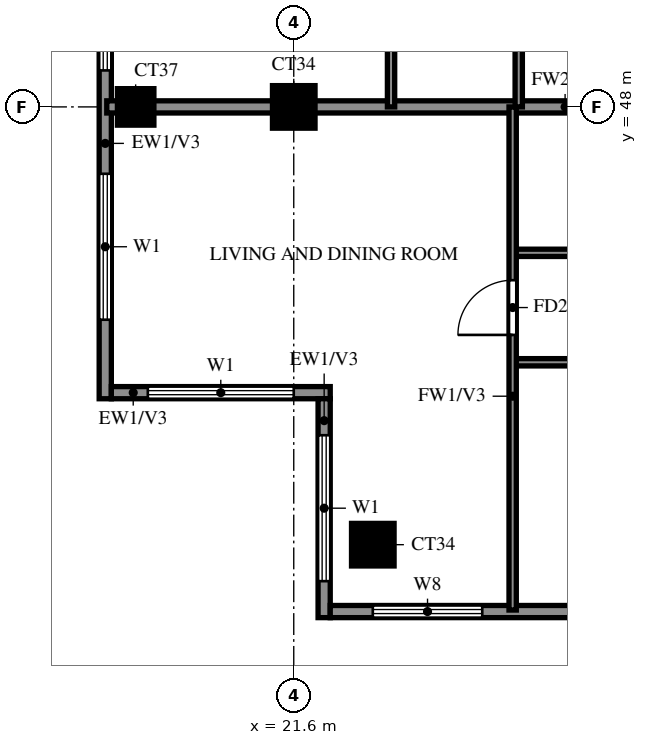
"""IFC4 building model, lengths in metres.
Left out: names, types, materials, properties, quantities, classifications, styles, units other than length and angle.
Written with IfcOpenShell. Run it as: python <this file> out.ifc"""

import sys

from ifc_helpers import new_model, si_unit, direction, frame, frame_2d, origin, origin_2d, place, context, subcontext, project, spatial, rectangle, extrude, source, transform, mapped, element, fill, save


model = new_model("IFC4")
c1 = context("Model", 3, precision=1e-05, world=origin(), true_north=direction((0.0, 1.0)))
c2 = subcontext(c1, "Body", "Model", "MODEL_VIEW")
j1 = project(units=[si_unit("LENGTHUNIT", "METRE"), si_unit("PLANEANGLEUNIT", "RADIAN")], contexts=[c1])
p1 = place(None, origin())
s1 = spatial("IfcSite", under=j1, at=p1, CompositionType="ELEMENT")
p2 = place(p1, origin())
s2 = spatial("IfcBuilding", under=s1, at=p2, CompositionType="ELEMENT")
p3 = place(p2, frame((0.0, 0.0, 257.0)))
s3 = spatial("IfcBuildingStorey", under=s2, at=p3, CompositionType="ELEMENT", Elevation=257.0)
m1 = source(origin(), c2, "Body", "SweptSolid", [
    extrude(rectangle(XDim=0.7, YDim=0.7, at=origin_2d()), origin(), (0.0, 0.0, 1.0), 3.22),
])
p4 = place(p3, frame((22.9, 40.8, 0.0), z_axis=(0.0, 0.0, 1.0), x_axis=(1.0, 0.0, 0.0)))
e1 = element("IfcColumn", 1, at=p4, inside=s3, PredefinedType="COLUMN", context=c2, shape_type="MappedRepresentation", body=[
    mapped(m1, transform((0.0, 0.0, 0.0))),
])
m2 = source(origin(), c2, "Body", "SweptSolid", [
    extrude(rectangle(XDim=0.6, YDim=0.6, at=origin_2d()), origin(), (0.0, 0.0, 1.0), 3.22),
])
p5 = place(p3, frame((19.0, 48.0, 0.0), z_axis=(0.0, 0.0, 1.0), x_axis=(1.0, 0.0, 0.0)))
e2 = element("IfcColumn", 2, at=p5, inside=s3, PredefinedType="COLUMN", context=c2, shape_type="MappedRepresentation", body=[
    mapped(m2, transform((0.0, 0.0, 0.0))),
])
p6 = place(p3, frame((21.6, 48.0, 0.0), z_axis=(0.0, 0.0, 1.0), x_axis=(1.0, 0.0, 0.0)))
e3 = element("IfcColumn", 3, at=p6, inside=s3, PredefinedType="COLUMN", context=c2, shape_type="MappedRepresentation", body=[
    mapped(m1, transform((0.0, 0.0, 0.0))),
])
p7 = place(p3, frame((18.5, 55.2, 0.0), z_axis=(0.0, 0.0, 1.0), x_axis=(0.0, -1.0, 0.0)))
e4 = element("IfcWall", 4, at=p7, inside=s3, PredefinedType="SOLIDWALL", context=c2, shape_type="SweptSolid", body=[
    extrude(rectangle(XDim=12.0, YDim=0.2, at=frame_2d((6.0, 0.0))), origin(), (0.0, 0.0, 1.0), 3.22),
])
p8 = place(p7, frame((8.3, 0.0, 0.6)))
e5 = element("IfcOpeningElement", 5, at=p8, cuts=e4, PredefinedType="OPENING", context=c2, shape_type="SweptSolid", body=[
    extrude(rectangle(XDim=2.4, YDim=2.4, at=frame_2d((1.2, 1.2))), frame((0.0, 0.11, 0.0), z_axis=(0.0, -1.0, 0.0), x_axis=(1.0, 0.0, 0.0)), (0.0, 0.0, 1.0), 0.22),
])
p9 = place(p7, frame((4.2, 0.0, 0.6)))
e6 = element("IfcOpeningElement", 6, at=p9, cuts=e4, PredefinedType="OPENING", context=c2, shape_type="SweptSolid", body=[
    extrude(rectangle(XDim=2.4, YDim=2.4, at=frame_2d((1.2, 1.2))), frame((0.0, 0.11, 0.0), z_axis=(0.0, -1.0, 0.0), x_axis=(1.0, 0.0, 0.0)), (0.0, 0.0, 1.0), 0.22),
])
p10 = place(p7, frame((0.7, 0.0, 0.6)))
e7 = element("IfcOpeningElement", 7, at=p10, cuts=e4, PredefinedType="OPENING", context=c2, shape_type="SweptSolid", body=[
    extrude(rectangle(XDim=2.4, YDim=2.4, at=frame_2d((1.2, 1.2))), frame((0.0, 0.11, 0.0), z_axis=(0.0, -1.0, 0.0), x_axis=(1.0, 0.0, 0.0)), (0.0, 0.0, 1.0), 0.22),
])
p11 = place(p3, frame((18.6, 43.3, 0.0), z_axis=(0.0, 0.0, 1.0), x_axis=(1.0, 0.0, 0.0)))
e8 = element("IfcWall", 8, at=p11, inside=s3, PredefinedType="SOLIDWALL", context=c2, shape_type="SweptSolid", body=[
    extrude(rectangle(XDim=3.6, YDim=0.2, at=frame_2d((1.8, 0.0))), origin(), (0.0, 0.0, 1.0), 3.22),
])
p12 = place(p11, frame((0.6, 0.0, 0.6)))
e9 = element("IfcOpeningElement", 9, at=p12, cuts=e8, PredefinedType="OPENING", context=c2, shape_type="SweptSolid", body=[
    extrude(rectangle(XDim=2.4, YDim=2.4, at=frame_2d((1.2, 1.2))), frame((0.0, 0.11, 0.0), z_axis=(0.0, -1.0, 0.0), x_axis=(1.0, 0.0, 0.0)), (0.0, 0.0, 1.0), 0.22),
])
p13 = place(p3, frame((22.1, 43.2, 0.0), z_axis=(0.0, 0.0, 1.0), x_axis=(0.0, -1.0, 0.0)))
e10 = element("IfcWall", 10, at=p13, inside=s3, PredefinedType="SOLIDWALL", context=c2, shape_type="SweptSolid", body=[
    extrude(rectangle(XDim=3.6, YDim=0.2, at=frame_2d((1.8, 0.0))), origin(), (0.0, 0.0, 1.0), 3.22),
])
p14 = place(p13, frame((0.6, 0.0, 0.6)))
e11 = element("IfcOpeningElement", 11, at=p14, cuts=e10, PredefinedType="OPENING", context=c2, shape_type="SweptSolid", body=[
    extrude(rectangle(XDim=2.4, YDim=2.4, at=frame_2d((1.2, 1.2))), frame((0.0, 0.11, 0.0), z_axis=(0.0, -1.0, 0.0), x_axis=(1.0, 0.0, 0.0)), (0.0, 0.0, 1.0), 0.22),
])
p15 = place(p3, frame((22.2, 39.7, 0.0), z_axis=(0.0, 0.0, 1.0), x_axis=(1.0, 0.0, 0.0)))
e12 = element("IfcWall", 12, at=p15, inside=s3, PredefinedType="SOLIDWALL", context=c2, shape_type="SweptSolid", body=[
    extrude(rectangle(XDim=19.8, YDim=0.2, at=frame_2d((9.9, 0.0))), origin(), (0.0, 0.0, 1.0), 3.22),
])
p16 = place(p15, frame((0.7, 0.0, 0.6)))
e13 = element("IfcOpeningElement", 13, at=p16, cuts=e12, PredefinedType="OPENING", context=c2, shape_type="SweptSolid", body=[
    extrude(rectangle(XDim=1.8, YDim=2.4, at=frame_2d((0.9, 1.2))), frame((0.0, 0.11, 0.0), z_axis=(0.0, -1.0, 0.0), x_axis=(1.0, 0.0, 0.0)), (0.0, 0.0, 1.0), 0.22),
])
p17 = place(p15, frame((4.35, 0.0, 1.5)))
e14 = element("IfcOpeningElement", 14, at=p17, cuts=e12, PredefinedType="OPENING", context=c2, shape_type="SweptSolid", body=[
    extrude(rectangle(XDim=0.9, YDim=0.9, at=frame_2d((0.45, 0.45))), frame((0.0, 0.11, 0.0), z_axis=(0.0, -1.0, 0.0), x_axis=(1.0, 0.0, 0.0)), (0.0, 0.0, 1.0), 0.22),
])
p18 = place(p15, frame((7.8, 0.0, 0.6)))
e15 = element("IfcOpeningElement", 15, at=p18, cuts=e12, PredefinedType="OPENING", context=c2, shape_type="SweptSolid", body=[
    extrude(rectangle(XDim=2.4, YDim=2.4, at=frame_2d((1.2, 1.2))), frame((0.0, 0.11, 0.0), z_axis=(0.0, -1.0, 0.0), x_axis=(1.0, 0.0, 0.0)), (0.0, 0.0, 1.0), 0.22),
])
p19 = place(p3, frame((18.525, 48.0, 0.0), z_axis=(0.0, 0.0, 1.0), x_axis=(1.0, 0.0, 0.0)))
e16 = element("IfcWall", 16, at=p19, inside=s3, PredefinedType="SOLIDWALL", context=c2, shape_type="SweptSolid", body=[
    extrude(rectangle(XDim=15.075, YDim=0.2, at=frame_2d((7.538, 0.0))), origin(), (0.0, 0.0, 1.0), 3.22),
])
p20 = place(p3, frame((25.2, 43.8, 0.0), z_axis=(0.0, 0.0, 1.0), x_axis=(1.0, 0.0, 0.0)))
e17 = element("IfcWall", 17, at=p20, inside=s3, PredefinedType="PARTITIONING", context=c2, shape_type="SweptSolid", body=[
    extrude(rectangle(XDim=8.4, YDim=0.12, at=frame_2d((4.2, 0.0))), origin(), (0.0, 0.0, 1.0), 3.22),
])
p21 = place(p20, frame((1.35, 0.0, 0.0)))
e18 = element("IfcOpeningElement", 18, at=p21, cuts=e17, PredefinedType="OPENING", context=c2, shape_type="SweptSolid", body=[
    extrude(rectangle(XDim=0.9, YDim=2.1, at=frame_2d((0.45, 1.05))), frame((0.0, 0.07, 0.0), z_axis=(0.0, -1.0, 0.0), x_axis=(1.0, 0.0, 0.0)), (0.0, 0.0, 1.0), 0.14),
])
p22 = place(p20, frame((5.55, 0.0, 0.0)))
e19 = element("IfcOpeningElement", 19, at=p22, cuts=e17, PredefinedType="OPENING", context=c2, shape_type="SweptSolid", body=[
    extrude(rectangle(XDim=0.9, YDim=2.1, at=frame_2d((0.45, 1.05))), frame((0.0, 0.07, 0.0), z_axis=(0.0, -1.0, 0.0), x_axis=(1.0, 0.0, 0.0)), (0.0, 0.0, 1.0), 0.14),
])
p23 = place(p3, frame((25.2, 45.6, 0.0), z_axis=(0.0, 0.0, 1.0), x_axis=(1.0, 0.0, 0.0)))
e20 = element("IfcWall", 20, at=p23, inside=s3, PredefinedType="PARTITIONING", context=c2, shape_type="SweptSolid", body=[
    extrude(rectangle(XDim=6.0, YDim=0.12, at=frame_2d((3.0, 0.0))), origin(), (0.0, 0.0, 1.0), 3.22),
])
p24 = place(p23, frame((2.55, 0.0, 0.0)))
e21 = element("IfcOpeningElement", 21, at=p24, cuts=e20, PredefinedType="OPENING", context=c2, shape_type="SweptSolid", body=[
    extrude(rectangle(XDim=0.9, YDim=2.1, at=frame_2d((0.45, 1.05))), frame((0.0, 0.07, 0.0), z_axis=(0.0, -1.0, 0.0), x_axis=(1.0, 0.0, 0.0)), (0.0, 0.0, 1.0), 0.14),
])
p25 = place(p3, frame((23.2, 48.0, 0.0), z_axis=(0.0, 0.0, 1.0), x_axis=(0.0, 1.0, 0.0)))
e22 = element("IfcWall", 22, at=p25, inside=s3, PredefinedType="PARTITIONING", context=c2, shape_type="SweptSolid", body=[
    extrude(rectangle(XDim=21.6, YDim=0.12, at=frame_2d((10.8, 0.0))), origin(), (0.0, 0.0, 1.0), 3.22),
])
p26 = place(p25, frame((1.35, 0.0, 0.0)))
e23 = element("IfcOpeningElement", 23, at=p26, cuts=e22, PredefinedType="OPENING", context=c2, shape_type="SweptSolid", body=[
    extrude(rectangle(XDim=0.9, YDim=2.1, at=frame_2d((0.45, 1.05))), frame((0.0, 0.07, 0.0), z_axis=(0.0, -1.0, 0.0), x_axis=(1.0, 0.0, 0.0)), (0.0, 0.0, 1.0), 0.14),
])
p27 = place(p25, frame((7.95, 0.0, 0.0)))
e24 = element("IfcOpeningElement", 24, at=p27, cuts=e22, PredefinedType="OPENING", context=c2, shape_type="SweptSolid", body=[
    extrude(rectangle(XDim=1.5, YDim=2.1, at=frame_2d((0.75, 1.05))), frame((0.0, 0.07, 0.0), z_axis=(0.0, -1.0, 0.0), x_axis=(1.0, 0.0, 0.0)), (0.0, 0.0, 1.0), 0.14),
])
p28 = place(p25, frame((12.15, 0.0, 0.0)))
e25 = element("IfcOpeningElement", 25, at=p28, cuts=e22, PredefinedType="OPENING", context=c2, shape_type="SweptSolid", body=[
    extrude(rectangle(XDim=0.9, YDim=2.1, at=frame_2d((0.45, 1.05))), frame((0.0, 0.07, 0.0), z_axis=(0.0, -1.0, 0.0), x_axis=(1.0, 0.0, 0.0)), (0.0, 0.0, 1.0), 0.14),
])
p29 = place(p25, frame((17.55, 0.0, 0.0)))
e26 = element("IfcOpeningElement", 26, at=p29, cuts=e22, PredefinedType="OPENING", context=c2, shape_type="SweptSolid", body=[
    extrude(rectangle(XDim=0.9, YDim=2.1, at=frame_2d((0.45, 1.05))), frame((0.0, 0.07, 0.0), z_axis=(0.0, -1.0, 0.0), x_axis=(1.0, 0.0, 0.0)), (0.0, 0.0, 1.0), 0.14),
])
p30 = place(p3, frame((25.2, 39.725, 0.0), z_axis=(0.0, 0.0, 1.0), x_axis=(0.0, 1.0, 0.0)))
e27 = element("IfcWall", 27, at=p30, inside=s3, PredefinedType="PARTITIONING", context=c2, shape_type="SweptSolid", body=[
    extrude(rectangle(XDim=8.275, YDim=0.12, at=frame_2d((4.137, 0.0))), origin(), (0.0, 0.0, 1.0), 3.22),
])
p31 = place(p30, frame((4.525, 0.0, 0.0)))
e28 = element("IfcOpeningElement", 28, at=p31, cuts=e27, PredefinedType="OPENING", context=c2, shape_type="SweptSolid", body=[
    extrude(rectangle(XDim=0.9, YDim=2.1, at=frame_2d((0.45, 1.05))), frame((0.0, 0.07, 0.0), z_axis=(0.0, -1.0, 0.0), x_axis=(1.0, 0.0, 0.0)), (0.0, 0.0, 1.0), 0.14),
])
p32 = place(p3, frame((25.3, 48.0, 0.0), z_axis=(0.0, 0.0, 1.0), x_axis=(0.0, 1.0, 0.0)))
e29 = element("IfcWall", 29, at=p32, inside=s3, PredefinedType="PARTITIONING", context=c2, shape_type="SweptSolid", body=[
    extrude(rectangle(XDim=3.6, YDim=0.12, at=frame_2d((1.8, 0.0))), origin(), (0.0, 0.0, 1.0), 3.22),
])
p33 = place(p32, frame((1.4, 0.0, 0.0)))
e30 = element("IfcOpeningElement", 30, at=p33, cuts=e29, PredefinedType="OPENING", context=c2, shape_type="SweptSolid", body=[
    extrude(rectangle(XDim=0.8, YDim=2.1, at=frame_2d((0.4, 1.05))), frame((0.0, 0.07, 0.0), z_axis=(0.0, -1.0, 0.0), x_axis=(1.0, 0.0, 0.0)), (0.0, 0.0, 1.0), 0.14),
])
p34 = place(p8, origin())
e31 = element("IfcWindow", 31, at=p34, inside=s3, PartitioningType="DOUBLE_PANEL_VERTICAL", PredefinedType="WINDOW", context=c2, shape_type="SweptSolid", body=[
    extrude(rectangle(XDim=2.4, YDim=2.4, at=frame_2d((1.2, 1.2))), frame((0.0, 0.03, 0.0), z_axis=(0.0, -1.0, 0.0), x_axis=(1.0, 0.0, 0.0)), (0.0, 0.0, 1.0), 0.06),
])
fill(e5, e31)
p35 = place(p9, origin())
e32 = element("IfcWindow", 32, at=p35, inside=s3, PartitioningType="DOUBLE_PANEL_VERTICAL", PredefinedType="WINDOW", context=c2, shape_type="SweptSolid", body=[
    extrude(rectangle(XDim=2.4, YDim=2.4, at=frame_2d((1.2, 1.2))), frame((0.0, 0.03, 0.0), z_axis=(0.0, -1.0, 0.0), x_axis=(1.0, 0.0, 0.0)), (0.0, 0.0, 1.0), 0.06),
])
fill(e6, e32)
p36 = place(p12, origin())
e33 = element("IfcWindow", 33, at=p36, inside=s3, PartitioningType="DOUBLE_PANEL_VERTICAL", PredefinedType="WINDOW", context=c2, shape_type="SweptSolid", body=[
    extrude(rectangle(XDim=2.4, YDim=2.4, at=frame_2d((1.2, 1.2))), frame((0.0, 0.03, 0.0), z_axis=(0.0, -1.0, 0.0), x_axis=(1.0, 0.0, 0.0)), (0.0, 0.0, 1.0), 0.06),
])
fill(e9, e33)
p37 = place(p14, origin())
e34 = element("IfcWindow", 34, at=p37, inside=s3, PartitioningType="DOUBLE_PANEL_VERTICAL", PredefinedType="WINDOW", context=c2, shape_type="SweptSolid", body=[
    extrude(rectangle(XDim=2.4, YDim=2.4, at=frame_2d((1.2, 1.2))), frame((0.0, 0.03, 0.0), z_axis=(0.0, -1.0, 0.0), x_axis=(1.0, 0.0, 0.0)), (0.0, 0.0, 1.0), 0.06),
])
fill(e11, e34)
p38 = place(p16, origin())
e35 = element("IfcWindow", 35, at=p38, inside=s3, PartitioningType="DOUBLE_PANEL_VERTICAL", PredefinedType="WINDOW", context=c2, shape_type="SweptSolid", body=[
    extrude(rectangle(XDim=1.8, YDim=2.4, at=frame_2d((0.9, 1.2))), frame((0.0, 0.03, 0.0), z_axis=(0.0, -1.0, 0.0), x_axis=(1.0, 0.0, 0.0)), (0.0, 0.0, 1.0), 0.06),
])
fill(e13, e35)
p39 = place(p31, origin())
e36 = element("IfcDoor", 36, at=p39, inside=s3, OperationType="SINGLE_SWING_LEFT", PredefinedType="DOOR", context=c2, shape_type="SweptSolid", body=[
    extrude(rectangle(XDim=0.9, YDim=2.1, at=frame_2d((0.45, 1.05))), frame((0.0, 0.025, 0.0), z_axis=(0.0, -1.0, 0.0), x_axis=(1.0, 0.0, 0.0)), (0.0, 0.0, 1.0), 0.05),
])
fill(e28, e36)
save(model, sys.argv[1])
